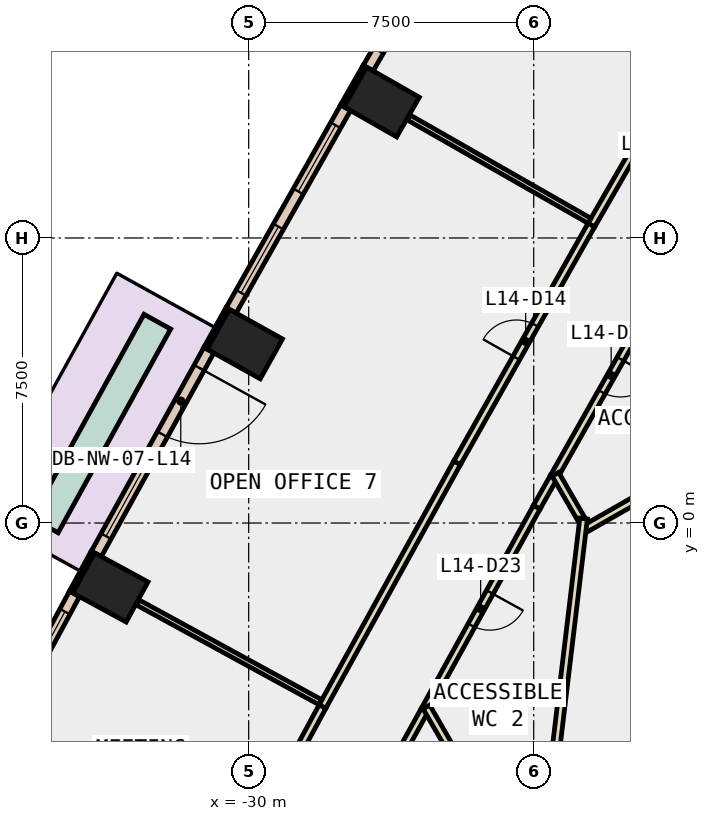
"""IFC4 building model, lengths in metres.
Left out: names, types, materials, properties, quantities, classifications, styles, units other than length and angle.
Written with IfcOpenShell. Run it as: python <this file> out.ifc"""

import sys

from ifc_helpers import new_model, si_unit, direction, frame, frame_2d, origin, origin_2d, place, context, subcontext, project, spatial, rectangle, extrude, element, fill, save


model = new_model("IFC4")
c1 = context("Model", 3, precision=1e-05, world=origin(), true_north=direction((0.0, 1.0)))
c2 = subcontext(c1, "Body", "Model", "MODEL_VIEW")
j1 = project(units=[si_unit("LENGTHUNIT", "METRE"), si_unit("PLANEANGLEUNIT", "RADIAN")], contexts=[c1])
p1 = place(None, origin())
s1 = spatial("IfcSite", under=j1, at=p1, CompositionType="ELEMENT")
p2 = place(p1, origin())
s2 = spatial("IfcBuilding", under=s1, at=p2, CompositionType="ELEMENT")
p3 = place(p2, frame((0.0, 0.0, 68.6)))
s3 = spatial("IfcBuildingStorey", under=s2, at=p3, CompositionType="ELEMENT", Elevation=68.6)
for number, where, z_axis, x_axis in (
    (1, (-26.503, 11.078, -0.4), (0.0, 0.0, 1.0), (0.496, 0.869, 0.0)),
    (2, (-30.102, 4.708, -0.4), (0.0, 0.0, 1.0), (0.487, 0.873, 0.0)),
    (3, (-33.64, -1.695, -0.4), (0.0, 0.0, 1.0), (0.478, 0.878, 0.0)),
):
    element("IfcColumn", number, at=place(p3, frame(where, z_axis=z_axis, x_axis=x_axis)), inside=s3, PredefinedType="COLUMN", context=c2, shape_type="SweptSolid", body=[
        extrude(rectangle(XDim=1.2, YDim=1.6, at=origin_2d()), origin(), (0.0, 0.0, 1.0), 4.2),
    ])
p4 = place(p3, frame((-26.944, 12.02, 0.0), z_axis=(0.0, 0.0, 1.0), x_axis=(-0.495854054996, -0.868405870629, 0.0)))
e4 = element("IfcWall", 4, at=p4, inside=s3, PredefinedType="STANDARD", context=c2, shape_type="SweptSolid", body=[
    extrude(rectangle(XDim=1.2, YDim=0.1, at=frame_2d((0.6, 0.0))), origin(), (0.0, 0.0, 1.0), 3.8),
])
p5 = place(p3, frame((-30.552, 5.646, 0.0), z_axis=(0.0, 0.0, 1.0), x_axis=(-0.486730996044, -0.87355190887, 0.0)))
e5 = element("IfcWall", 5, at=p5, inside=s3, PredefinedType="STANDARD", context=c2, shape_type="SweptSolid", body=[
    extrude(rectangle(XDim=1.2, YDim=0.1, at=frame_2d((0.6, 0.0))), origin(), (0.0, 0.0, 1.0), 3.8),
])
p6 = place(p3, frame((-34.099, -0.762, 0.0), z_axis=(0.0, 0.0, 1.0), x_axis=(-0.478267644701, -0.878214131082, 0.0)))
e6 = element("IfcWall", 6, at=p6, inside=s3, PredefinedType="STANDARD", context=c2, shape_type="SweptSolid", body=[
    extrude(rectangle(XDim=1.2, YDim=0.1, at=frame_2d((0.6, 0.0))), origin(), (0.0, 0.0, 1.0), 3.8),
])
p7 = place(p3, frame((-23.793, 17.273, 0.0), z_axis=(0.0, 0.0, 1.0), x_axis=(-0.499903021601, -0.86608138705, 0.0)))
e7 = element("IfcWall", 7, at=p7, inside=s3, PredefinedType="STANDARD", context=c2, shape_type="SweptSolid", body=[
    extrude(rectangle(XDim=6.125, YDim=0.3, at=frame_2d((3.062, 0.0))), origin(), (0.0, 0.0, 1.0), 3.8),
])
p8 = place(p7, frame((0.531, 0.0, 0.9)))
e8 = element("IfcOpeningElement", 8, at=p8, cuts=e7, PredefinedType="OPENING", context=c2, shape_type="SweptSolid", body=[
    extrude(rectangle(XDim=2.0, YDim=2.6, at=frame_2d((1.0, 1.3))), frame((0.0, 0.16, 0.0), z_axis=(0.0, -1.0, 0.0), x_axis=(1.0, 0.0, 0.0)), (0.0, 0.0, 1.0), 0.32),
])
p9 = place(p7, frame((3.594, 0.0, 0.9)))
e9 = element("IfcOpeningElement", 9, at=p9, cuts=e7, PredefinedType="OPENING", context=c2, shape_type="SweptSolid", body=[
    extrude(rectangle(XDim=2.0, YDim=2.6, at=frame_2d((1.0, 1.3))), frame((0.0, 0.16, 0.0), z_axis=(0.0, -1.0, 0.0), x_axis=(1.0, 0.0, 0.0)), (0.0, 0.0, 1.0), 0.32),
])
p10 = place(p3, frame((-27.449, 10.928, 0.0), z_axis=(0.0, 0.0, 1.0), x_axis=(-0.491887822214, -0.870658584267, 0.0)))
e10 = element("IfcWall", 10, at=p10, inside=s3, PredefinedType="STANDARD", context=c2, shape_type="SweptSolid", body=[
    extrude(rectangle(XDim=6.125, YDim=0.3, at=frame_2d((3.062, 0.0))), origin(), (0.0, 0.0, 1.0), 3.8),
])
p11 = place(p10, frame((0.531, 0.0, 0.9)))
e11 = element("IfcOpeningElement", 11, at=p11, cuts=e10, PredefinedType="OPENING", context=c2, shape_type="SweptSolid", body=[
    extrude(rectangle(XDim=2.0, YDim=2.6, at=frame_2d((1.0, 1.3))), frame((0.0, 0.16, 0.0), z_axis=(0.0, -1.0, 0.0), x_axis=(1.0, 0.0, 0.0)), (0.0, 0.0, 1.0), 0.32),
])
p12 = place(p10, frame((3.594, 0.0, 0.9)))
e12 = element("IfcOpeningElement", 12, at=p12, cuts=e10, PredefinedType="OPENING", context=c2, shape_type="SweptSolid", body=[
    extrude(rectangle(XDim=2.0, YDim=2.6, at=frame_2d((1.0, 1.3))), frame((0.0, 0.16, 0.0), z_axis=(0.0, -1.0, 0.0), x_axis=(1.0, 0.0, 0.0)), (0.0, 0.0, 1.0), 0.32),
])
p13 = place(p3, frame((-31.047, 4.549, 0.0), z_axis=(0.0, 0.0, 1.0), x_axis=(-0.483587271547, -0.875296150339, 0.0)))
e13 = element("IfcWall", 13, at=p13, inside=s3, PredefinedType="STANDARD", context=c2, shape_type="SweptSolid", body=[
    extrude(rectangle(XDim=6.125, YDim=0.3, at=frame_2d((3.062, 0.0))), origin(), (0.0, 0.0, 1.0), 3.8),
])
p14 = place(p13, frame((0.531, 0.0, 0.0)))
e14 = element("IfcOpeningElement", 14, at=p14, cuts=e13, PredefinedType="OPENING", context=c2, shape_type="SweptSolid", body=[
    extrude(rectangle(XDim=2.0, YDim=2.4, at=frame_2d((1.0, 1.2))), frame((0.0, 0.16, 0.0), z_axis=(0.0, -1.0, 0.0), x_axis=(1.0, 0.0, 0.0)), (0.0, 0.0, 1.0), 0.32),
])
p15 = place(p13, frame((3.594, 0.0, 0.9)))
e15 = element("IfcOpeningElement", 15, at=p15, cuts=e13, PredefinedType="OPENING", context=c2, shape_type="SweptSolid", body=[
    extrude(rectangle(XDim=2.0, YDim=2.6, at=frame_2d((1.0, 1.3))), frame((0.0, 0.16, 0.0), z_axis=(0.0, -1.0, 0.0), x_axis=(1.0, 0.0, 0.0)), (0.0, 0.0, 1.0), 0.32),
])
p16 = place(p3, frame((-34.583, -1.864, 0.0), z_axis=(0.0, 0.0, 1.0), x_axis=(-0.475413659872, -0.879762383833, 0.0)))
e16 = element("IfcWall", 16, at=p16, inside=s3, PredefinedType="STANDARD", context=c2, shape_type="SweptSolid", body=[
    extrude(rectangle(XDim=6.125, YDim=0.3, at=frame_2d((3.063, 0.0))), origin(), (0.0, 0.0, 1.0), 3.8),
])
p17 = place(p16, frame((0.531, 0.0, 0.9)))
e17 = element("IfcOpeningElement", 17, at=p17, cuts=e16, PredefinedType="OPENING", context=c2, shape_type="SweptSolid", body=[
    extrude(rectangle(XDim=2.0, YDim=2.6, at=frame_2d((1.0, 1.3))), frame((0.0, 0.16, 0.0), z_axis=(0.0, -1.0, 0.0), x_axis=(1.0, 0.0, 0.0)), (0.0, 0.0, 1.0), 0.32),
])
p18 = place(p16, frame((3.594, 0.0, 0.9)))
e18 = element("IfcOpeningElement", 18, at=p18, cuts=e16, PredefinedType="OPENING", context=c2, shape_type="SweptSolid", body=[
    extrude(rectangle(XDim=2.0, YDim=2.6, at=frame_2d((1.0, 1.3))), frame((0.0, 0.16, 0.0), z_axis=(0.0, -1.0, 0.0), x_axis=(1.0, 0.0, 0.0)), (0.0, 0.0, 1.0), 0.32),
])
p19 = place(p3, frame((-32.404, 5.298, 0.0), z_axis=(0.0, 0.0, 1.0), x_axis=(-0.48346510207, -0.875363635914, 0.0)))
e19 = element("IfcWall", 19, at=p19, inside=s3, PredefinedType="STANDARD", context=c2, shape_type="SweptSolid", body=[
    extrude(rectangle(XDim=6.125, YDim=0.8, at=frame_2d((3.062, 0.0))), origin(), (0.0, 0.0, 1.0), 0.8),
])
p20 = place(p3, frame((-18.945, 6.567, 0.0), z_axis=(0.0, 0.0, 1.0), x_axis=(-0.491840751019, -0.87068517596, 0.0)))
e20 = element("IfcWall", 20, at=p20, inside=s3, PredefinedType="PARTITIONING", context=c2, shape_type="SweptSolid", body=[
    extrude(rectangle(XDim=6.168, YDim=0.2, at=frame_2d((3.084, 0.0))), origin(), (0.0, 0.0, 1.0), 3.8),
])
p21 = place(p20, frame((2.584, 0.0, 0.0)))
e21 = element("IfcOpeningElement", 21, at=p21, cuts=e20, PredefinedType="OPENING", context=c2, shape_type="SweptSolid", body=[
    extrude(rectangle(XDim=1.0, YDim=2.1, at=frame_2d((0.5, 1.05))), frame((0.0, 0.11, 0.0), z_axis=(0.0, -1.0, 0.0), x_axis=(1.0, 0.0, 0.0)), (0.0, 0.0, 1.0), 0.22),
])
p22 = place(p3, frame((-25.371, -4.927, 0.0), z_axis=(0.0, 0.0, 1.0), x_axis=(-0.483899488004, -0.875123582993, 0.0)))
e22 = element("IfcWall", 22, at=p22, inside=s3, PredefinedType="PARTITIONING", context=c2, shape_type="SweptSolid", body=[
    extrude(rectangle(XDim=1.13, YDim=0.2, at=frame_2d((0.565, 0.0))), origin(), (0.0, 0.0, 1.0), 3.8),
])
p23 = place(p3, frame((-21.979, 1.196, 0.0), z_axis=(0.0, 0.0, 1.0), x_axis=(-0.491617674369, -0.870811151886, 0.0)))
e23 = element("IfcWall", 23, at=p23, inside=s3, PredefinedType="PARTITIONING", context=c2, shape_type="SweptSolid", body=[
    extrude(rectangle(XDim=0.897, YDim=0.2, at=frame_2d((0.448, 0.0))), origin(), (0.0, 0.0, 1.0), 3.8),
])
p24 = place(p3, frame((-22.42, 0.415, 0.0), z_axis=(0.0, 0.0, 1.0), x_axis=(-0.483559496818, -0.875311494861, 0.0)))
e24 = element("IfcWall", 24, at=p24, inside=s3, PredefinedType="PARTITIONING", context=c2, shape_type="SweptSolid", body=[
    extrude(rectangle(XDim=6.103, YDim=0.2, at=frame_2d((3.052, 0.0))), origin(), (0.0, 0.0, 1.0), 3.8),
])
p25 = place(p24, frame((2.552, 0.0, 0.0)))
e25 = element("IfcOpeningElement", 25, at=p25, cuts=e24, PredefinedType="OPENING", context=c2, shape_type="SweptSolid", body=[
    extrude(rectangle(XDim=1.0, YDim=2.1, at=frame_2d((0.5, 1.05))), frame((0.0, 0.11, 0.0), z_axis=(0.0, -1.0, 0.0), x_axis=(1.0, 0.0, 0.0)), (0.0, 0.0, 1.0), 0.22),
])
p26 = place(p3, frame((-17.356, 14.122, 0.0), z_axis=(0.0, 0.0, 1.0), x_axis=(-0.499946764175, -0.866056137321, 0.0)))
e26 = element("IfcWall", 26, at=p26, inside=s3, PredefinedType="PARTITIONING", context=c2, shape_type="SweptSolid", body=[
    extrude(rectangle(XDim=7.255, YDim=0.2, at=frame_2d((3.627, 0.0))), origin(), (0.0, 0.0, 1.0), 3.8),
])
p27 = place(p26, frame((3.052, 0.0, 0.0)))
e27 = element("IfcOpeningElement", 27, at=p27, cuts=e26, PredefinedType="OPENING", context=c2, shape_type="SweptSolid", body=[
    extrude(rectangle(XDim=1.0, YDim=2.1, at=frame_2d((0.5, 1.05))), frame((0.0, 0.11, 0.0), z_axis=(0.0, -1.0, 0.0), x_axis=(1.0, 0.0, 0.0)), (0.0, 0.0, 1.0), 0.22),
])
p28 = place(p3, frame((-28.06, -4.831, 0.0), z_axis=(0.0, 0.0, 1.0), x_axis=(0.483631054848, 0.875271959328, 0.0)))
e28 = element("IfcWall", 28, at=p28, inside=s3, PredefinedType="PARTITIONING", context=c2, shape_type="SweptSolid", body=[
    extrude(rectangle(XDim=7.33, YDim=0.2, at=frame_2d((3.665, 0.0))), origin(), (0.0, 0.0, 1.0), 3.8),
])
p29 = place(p3, frame((-24.515, 1.585, 0.0), z_axis=(0.0, 0.0, 1.0), x_axis=(0.49174361417, 0.870740040381, 0.0)))
e29 = element("IfcWall", 29, at=p29, inside=s3, PredefinedType="PARTITIONING", context=c2, shape_type="SweptSolid", body=[
    extrude(rectangle(XDim=7.183, YDim=0.2, at=frame_2d((3.591, 0.0))), origin(), (0.0, 0.0, 1.0), 3.8),
])
p30 = place(p29, frame((3.166, 0.0, 0.0)))
e30 = element("IfcOpeningElement", 30, at=p30, cuts=e29, PredefinedType="OPENING", context=c2, shape_type="SweptSolid", body=[
    extrude(rectangle(XDim=1.0, YDim=2.1, at=frame_2d((0.5, 1.05))), frame((0.0, 0.11, 0.0), z_axis=(0.0, -1.0, 0.0), x_axis=(1.0, 0.0, 0.0)), (0.0, 0.0, 1.0), 0.22),
])
p31 = place(p3, frame((-31.509, -11.216, 0.0), z_axis=(0.0, 0.0, 1.0), x_axis=(0.475367159168, 0.879787510701, 0.0)))
e31 = element("IfcWall", 31, at=p31, inside=s3, PredefinedType="PARTITIONING", context=c2, shape_type="SweptSolid", body=[
    extrude(rectangle(XDim=7.257, YDim=0.2, at=frame_2d((3.629, 0.0))), origin(), (0.0, 0.0, 1.0), 3.8),
])
p32 = place(p31, frame((3.203, 0.0, 0.0)))
e32 = element("IfcOpeningElement", 32, at=p32, cuts=e31, PredefinedType="OPENING", context=c2, shape_type="SweptSolid", body=[
    extrude(rectangle(XDim=1.0, YDim=2.1, at=frame_2d((0.5, 1.05))), frame((0.0, 0.11, 0.0), z_axis=(0.0, -1.0, 0.0), x_axis=(1.0, 0.0, 0.0)), (0.0, 0.0, 1.0), 0.22),
])
p33 = place(p3, frame((-14.946, 3.387, 0.0), z_axis=(0.0, 0.0, 1.0), x_axis=(-0.868556003823, -0.4955910292, 0.0)))
e33 = element("IfcWall", 33, at=p33, inside=s3, PredefinedType="PARTITIONING", context=c2, shape_type="SweptSolid", body=[
    extrude(rectangle(XDim=7.199, YDim=0.2, at=frame_2d((3.6, 0.0))), origin(), (0.0, 0.0, 1.0), 3.8),
])
p34 = place(p3, frame((-21.249, 0.105, 0.0), z_axis=(0.0, 0.0, 1.0), x_axis=(-0.500442009317, 0.865770059144, 0.0)))
e34 = element("IfcWall", 34, at=p34, inside=s3, PredefinedType="PARTITIONING", context=c2, shape_type="SweptSolid", body=[
    extrude(rectangle(XDim=1.361, YDim=0.2, at=frame_2d((0.68, 0.0))), origin(), (0.0, 0.0, 1.0), 3.8),
])
p35 = place(p3, frame((-25.323, -4.84, 0.0), z_axis=(0.0, 0.0, 1.0), x_axis=(0.500070797646, -0.865984524886, 0.0)))
e35 = element("IfcWall", 35, at=p35, inside=s3, PredefinedType="PARTITIONING", context=c2, shape_type="SweptSolid", body=[
    extrude(rectangle(XDim=5.763, YDim=0.2, at=frame_2d((2.882, 0.0))), origin(), (0.0, 0.0, 1.0), 3.8),
])
p36 = place(p3, frame((-22.403, -10.017, 0.0), z_axis=(0.0, 0.0, 1.0), x_axis=(0.119143334217, 0.992877064853, 0.0)))
e36 = element("IfcWall", 36, at=p36, inside=s3, PredefinedType="PARTITIONING", context=c2, shape_type="SweptSolid", body=[
    extrude(rectangle(XDim=10.207, YDim=0.2, at=frame_2d((5.104, 0.0))), origin(), (0.0, 0.0, 1.0), 3.8),
])
p37 = place(p3, frame((-21.033, 7.953, 0.0), z_axis=(0.0, 0.0, 1.0), x_axis=(-0.868311678357, 0.496018980715, 0.0)))
e37 = element("IfcWall", 37, at=p37, inside=s3, PredefinedType="PARTITIONING", context=c2, shape_type="SweptSolid", body=[
    extrude(rectangle(XDim=5.48, YDim=0.15, at=frame_2d((2.74, 0.0))), origin(), (0.0, 0.0, 1.0), 3.8),
])
p38 = place(p3, frame((-28.111, -4.717, 0.0), z_axis=(0.0, 0.0, 1.0), x_axis=(-0.877558297547, 0.479469951515, 0.0)))
e38 = element("IfcWall", 38, at=p38, inside=s3, PredefinedType="PARTITIONING", context=c2, shape_type="SweptSolid", body=[
    extrude(rectangle(XDim=5.481, YDim=0.15, at=frame_2d((2.74, 0.0))), origin(), (0.0, 0.0, 1.0), 3.8),
])
p39 = place(p11, origin())
e39 = element("IfcWindow", 39, at=p39, inside=s3, PartitioningType="SINGLE_PANEL", PredefinedType="WINDOW", context=c2, shape_type="SweptSolid", body=[
    extrude(rectangle(XDim=2.0, YDim=2.6, at=frame_2d((1.0, 1.3))), frame((0.0, 0.03, 0.0), z_axis=(0.0, -1.0, 0.0), x_axis=(1.0, 0.0, 0.0)), (0.0, 0.0, 1.0), 0.06),
])
fill(e11, e39)
p40 = place(p12, origin())
e40 = element("IfcWindow", 40, at=p40, inside=s3, PartitioningType="SINGLE_PANEL", PredefinedType="WINDOW", context=c2, shape_type="SweptSolid", body=[
    extrude(rectangle(XDim=2.0, YDim=2.6, at=frame_2d((1.0, 1.3))), frame((0.0, 0.03, 0.0), z_axis=(0.0, -1.0, 0.0), x_axis=(1.0, 0.0, 0.0)), (0.0, 0.0, 1.0), 0.06),
])
fill(e12, e40)
p41 = place(p14, origin())
e41 = element("IfcDoor", 41, at=p41, inside=s3, OperationType="SLIDING_TO_LEFT", PredefinedType="DOOR", context=c2, shape_type="SweptSolid", body=[
    extrude(rectangle(XDim=2.0, YDim=2.4, at=frame_2d((1.0, 1.2))), frame((0.0, 0.025, 0.0), z_axis=(0.0, -1.0, 0.0), x_axis=(1.0, 0.0, 0.0)), (0.0, 0.0, 1.0), 0.05),
])
fill(e14, e41)
p42 = place(p15, origin())
e42 = element("IfcWindow", 42, at=p42, inside=s3, PartitioningType="SINGLE_PANEL", PredefinedType="WINDOW", context=c2, shape_type="SweptSolid", body=[
    extrude(rectangle(XDim=2.0, YDim=2.6, at=frame_2d((1.0, 1.3))), frame((0.0, 0.03, 0.0), z_axis=(0.0, -1.0, 0.0), x_axis=(1.0, 0.0, 0.0)), (0.0, 0.0, 1.0), 0.06),
])
fill(e15, e42)
p43 = place(p17, origin())
e43 = element("IfcWindow", 43, at=p43, inside=s3, PartitioningType="SINGLE_PANEL", PredefinedType="WINDOW", context=c2, shape_type="SweptSolid", body=[
    extrude(rectangle(XDim=2.0, YDim=2.6, at=frame_2d((1.0, 1.3))), frame((0.0, 0.03, 0.0), z_axis=(0.0, -1.0, 0.0), x_axis=(1.0, 0.0, 0.0)), (0.0, 0.0, 1.0), 0.06),
])
fill(e17, e43)
p44 = place(p30, origin())
e44 = element("IfcDoor", 44, at=p44, inside=s3, OperationType="SINGLE_SWING_RIGHT", PredefinedType="DOOR", context=c2, shape_type="SweptSolid", body=[
    extrude(rectangle(XDim=1.0, YDim=2.1, at=frame_2d((0.5, 1.05))), frame((0.0, 0.025, 0.0), z_axis=(0.0, -1.0, 0.0), x_axis=(1.0, 0.0, 0.0)), (0.0, 0.0, 1.0), 0.05),
])
fill(e30, e44)
p45 = place(p21, origin())
e45 = element("IfcDoor", 45, at=p45, inside=s3, OperationType="SINGLE_SWING_LEFT", PredefinedType="DOOR", context=c2, shape_type="SweptSolid", body=[
    extrude(rectangle(XDim=1.0, YDim=2.1, at=frame_2d((0.5, 1.05))), frame((0.0, 0.025, 0.0), z_axis=(0.0, -1.0, 0.0), x_axis=(1.0, 0.0, 0.0)), (0.0, 0.0, 1.0), 0.05),
])
fill(e21, e45)
p46 = place(p25, origin())
e46 = element("IfcDoor", 46, at=p46, inside=s3, OperationType="SINGLE_SWING_LEFT", PredefinedType="DOOR", context=c2, shape_type="SweptSolid", body=[
    extrude(rectangle(XDim=1.0, YDim=2.1, at=frame_2d((0.5, 1.05))), frame((0.0, 0.025, 0.0), z_axis=(0.0, -1.0, 0.0), x_axis=(1.0, 0.0, 0.0)), (0.0, 0.0, 1.0), 0.05),
])
fill(e25, e46)
save(model, sys.argv[1])
